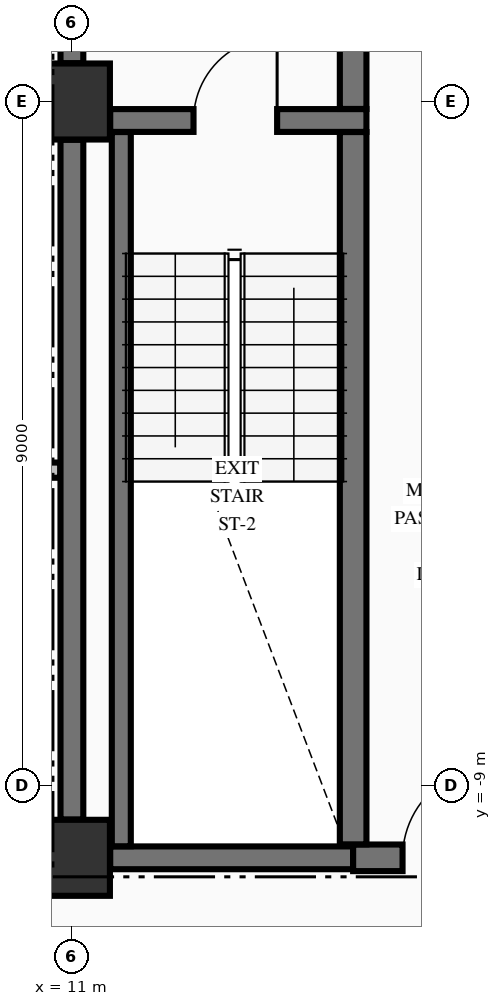
"""IFC4 building model, lengths in metres.
Left out: names, types, materials, properties, quantities, classifications, styles, units other than length and angle.
Written with IfcOpenShell. Run it as: python <this file> out.ifc"""

import sys

from ifc_helpers import new_model, si_unit, direction, frame, frame_2d, origin, origin_2d, place, context, subcontext, project, spatial, rectangle, extrude, element, fill, save


model = new_model("IFC4")
c1 = context("Model", 3, precision=1e-05, world=origin(), true_north=direction((0.0, 1.0)))
c2 = subcontext(c1, "Body", "Model", "MODEL_VIEW")
j1 = project(units=[si_unit("LENGTHUNIT", "METRE"), si_unit("PLANEANGLEUNIT", "RADIAN")], contexts=[c1])
p1 = place(None, origin())
s1 = spatial("IfcSite", under=j1, at=p1, CompositionType="ELEMENT")
p2 = place(p1, origin())
s2 = spatial("IfcBuilding", under=s1, at=p2, CompositionType="ELEMENT")
p3 = place(p2, frame((0.0, 0.0, 132.06)))
s3 = spatial("IfcBuildingStorey", under=s2, at=p3, CompositionType="ELEMENT", Elevation=132.06)
for number, where, z_axis, x_axis in (
    (1, (11.0, -9.95, -0.25), (0.0, 0.0, 1.0), (1.0, 0.0, 0.0)),
    (2, (11.0, 0.0, -0.25), (0.0, 0.0, 1.0), (1.0, 0.0, 0.0)),
):
    element("IfcColumn", number, at=place(p3, frame(where, z_axis=z_axis, x_axis=x_axis)), inside=s3, PredefinedType="COLUMN", context=c2, shape_type="SweptSolid", body=[
        extrude(rectangle(XDim=1.0, YDim=1.0, at=origin_2d()), origin(), (0.0, 0.0, 1.0), 3.57),
    ])
p4 = place(p3, frame((11.504, -9.95, 0.0), z_axis=(0.0, 0.0, 1.0), x_axis=(1.0, 0.0, 0.0)))
e3 = element("IfcWall", 3, at=p4, inside=s3, PredefinedType="SHEAR", context=c2, shape_type="SweptSolid", body=[
    extrude(rectangle(XDim=3.196, YDim=0.3, at=frame_2d((1.598, 0.0))), origin(), (0.0, 0.0, 1.0), 3.32),
])
p5 = place(p3, frame((14.7, -9.95, 0.0), z_axis=(0.0, 0.0, 1.0), x_axis=(1.0, 0.0, 0.0)))
e4 = element("IfcWall", 4, at=p5, inside=s3, PredefinedType="SHEAR", context=c2, shape_type="SweptSolid", body=[
    extrude(rectangle(XDim=4.796, YDim=0.35, at=frame_2d((2.398, 0.0))), origin(), (0.0, 0.0, 1.0), 3.32),
])
p6 = place(p5, frame((0.65, 0.0, 0.0)))
e5 = element("IfcOpeningElement", 5, at=p6, cuts=e4, PredefinedType="OPENING", context=c2, shape_type="SweptSolid", body=[
    extrude(rectangle(XDim=1.2, YDim=2.15, at=frame_2d((0.6, 1.075))), frame((0.0, 0.185, 0.0), z_axis=(0.0, -1.0, 0.0), x_axis=(1.0, 0.0, 0.0)), (0.0, 0.0, 1.0), 0.37),
])
p7 = place(p3, frame((11.504, -0.25, 0.0), z_axis=(0.0, 0.0, 1.0), x_axis=(1.0, 0.0, 0.0)))
e6 = element("IfcWall", 6, at=p7, inside=s3, PredefinedType="SHEAR", context=c2, shape_type="SweptSolid", body=[
    extrude(rectangle(XDim=3.371, YDim=0.3, at=frame_2d((1.686, 0.0))), origin(), (0.0, 0.0, 1.0), 3.32),
])
p8 = place(p7, frame((1.096, 0.0, 0.0)))
e7 = element("IfcOpeningElement", 7, at=p8, cuts=e6, PredefinedType="OPENING", context=c2, shape_type="SweptSolid", body=[
    extrude(rectangle(XDim=1.1, YDim=2.15, at=frame_2d((0.55, 1.075))), frame((0.0, 0.16, 0.0), z_axis=(0.0, -1.0, 0.0), x_axis=(1.0, 0.0, 0.0)), (0.0, 0.0, 1.0), 0.32),
])
p9 = place(p3, frame((-1.975, -4.85, 0.0), z_axis=(0.0, 0.0, 1.0), x_axis=(1.0, 0.0, 0.0)))
e8 = element("IfcWall", 8, at=p9, inside=s3, PredefinedType="PARTITIONING", context=c2, shape_type="SweptSolid", body=[
    extrude(rectangle(XDim=12.822, YDim=0.2, at=frame_2d((6.411, 0.0))), origin(), (0.0, 0.0, 1.0), 3.32),
])
p10 = place(p3, frame((11.0, -9.446, 0.0), z_axis=(0.0, 0.0, 1.0), x_axis=(0.0, 1.0, 0.0)))
e9 = element("IfcWall", 9, at=p10, inside=s3, PredefinedType="SHEAR", context=c2, shape_type="SweptSolid", body=[
    extrude(rectangle(XDim=8.942, YDim=0.3, at=frame_2d((4.471, 0.0))), origin(), (0.0, 0.0, 1.0), 3.32),
])
p11 = place(p3, frame((11.0, 0.504, 0.0), z_axis=(0.0, 0.0, 1.0), x_axis=(0.0, 1.0, 0.0)))
e10 = element("IfcWall", 10, at=p11, inside=s3, PredefinedType="SHEAR", context=c2, shape_type="SweptSolid", body=[
    extrude(rectangle(XDim=2.244, YDim=0.3, at=frame_2d((1.122, 0.0))), origin(), (0.0, 0.0, 1.0), 3.32),
])
p12 = place(p11, frame((0.596, 0.0, 0.0)))
e11 = element("IfcOpeningElement", 11, at=p12, cuts=e10, PredefinedType="OPENING", context=c2, shape_type="SweptSolid", body=[
    extrude(rectangle(XDim=1.1, YDim=2.15, at=frame_2d((0.55, 1.075))), frame((0.0, 0.16, 0.0), z_axis=(0.0, -1.0, 0.0), x_axis=(1.0, 0.0, 0.0)), (0.0, 0.0, 1.0), 0.32),
])
p13 = place(p3, frame((11.65, -9.798, 0.0), z_axis=(0.0, 0.0, 1.0), x_axis=(0.0, 1.0, 0.0)))
e12 = element("IfcWall", 12, at=p13, inside=s3, PredefinedType="SOLIDWALL", context=c2, shape_type="SweptSolid", body=[
    extrude(rectangle(XDim=9.396, YDim=0.25, at=frame_2d((4.698, 0.0))), origin(), (0.0, 0.0, 1.0), 3.32),
])
p14 = place(p3, frame((14.7, -9.773, 0.0), z_axis=(0.0, 0.0, 1.0), x_axis=(0.0, 1.0, 0.0)))
e13 = element("IfcWall", 13, at=p14, inside=s3, PredefinedType="SHEAR", context=c2, shape_type="SweptSolid", body=[
    extrude(rectangle(XDim=9.371, YDim=0.35, at=frame_2d((4.686, 0.0))), origin(), (0.0, 0.0, 1.0), 3.32),
])
p15 = place(p3, frame((14.7, -0.098, 0.0), z_axis=(0.0, 0.0, 1.0), x_axis=(0.0, 1.0, 0.0)))
e14 = element("IfcWall", 14, at=p15, inside=s3, PredefinedType="SHEAR", context=c2, shape_type="SweptSolid", body=[
    extrude(rectangle(XDim=2.846, YDim=0.35, at=frame_2d((1.423, 0.0))), origin(), (0.0, 0.0, 1.0), 3.32),
])
p16 = place(p8, origin())
e15 = element("IfcDoor", 15, at=p16, inside=s3, OperationType="SINGLE_SWING_RIGHT", PredefinedType="DOOR", context=c2, shape_type="SweptSolid", body=[
    extrude(rectangle(XDim=1.1, YDim=2.15, at=frame_2d((0.55, 1.075))), frame((0.0, 0.025, 0.0), z_axis=(0.0, -1.0, 0.0), x_axis=(1.0, 0.0, 0.0)), (0.0, 0.0, 1.0), 0.05),
])
fill(e7, e15)
p17 = place(p6, origin())
e16 = element("IfcDoor", 16, at=p17, inside=s3, OperationType="SINGLE_SWING_RIGHT", PredefinedType="DOOR", context=c2, shape_type="SweptSolid", body=[
    extrude(rectangle(XDim=1.2, YDim=2.15, at=frame_2d((0.6, 1.075))), frame((0.0, 0.025, 0.0), z_axis=(0.0, -1.0, 0.0), x_axis=(1.0, 0.0, 0.0)), (0.0, 0.0, 1.0), 0.05),
])
fill(e5, e16)
save(model, sys.argv[1])
